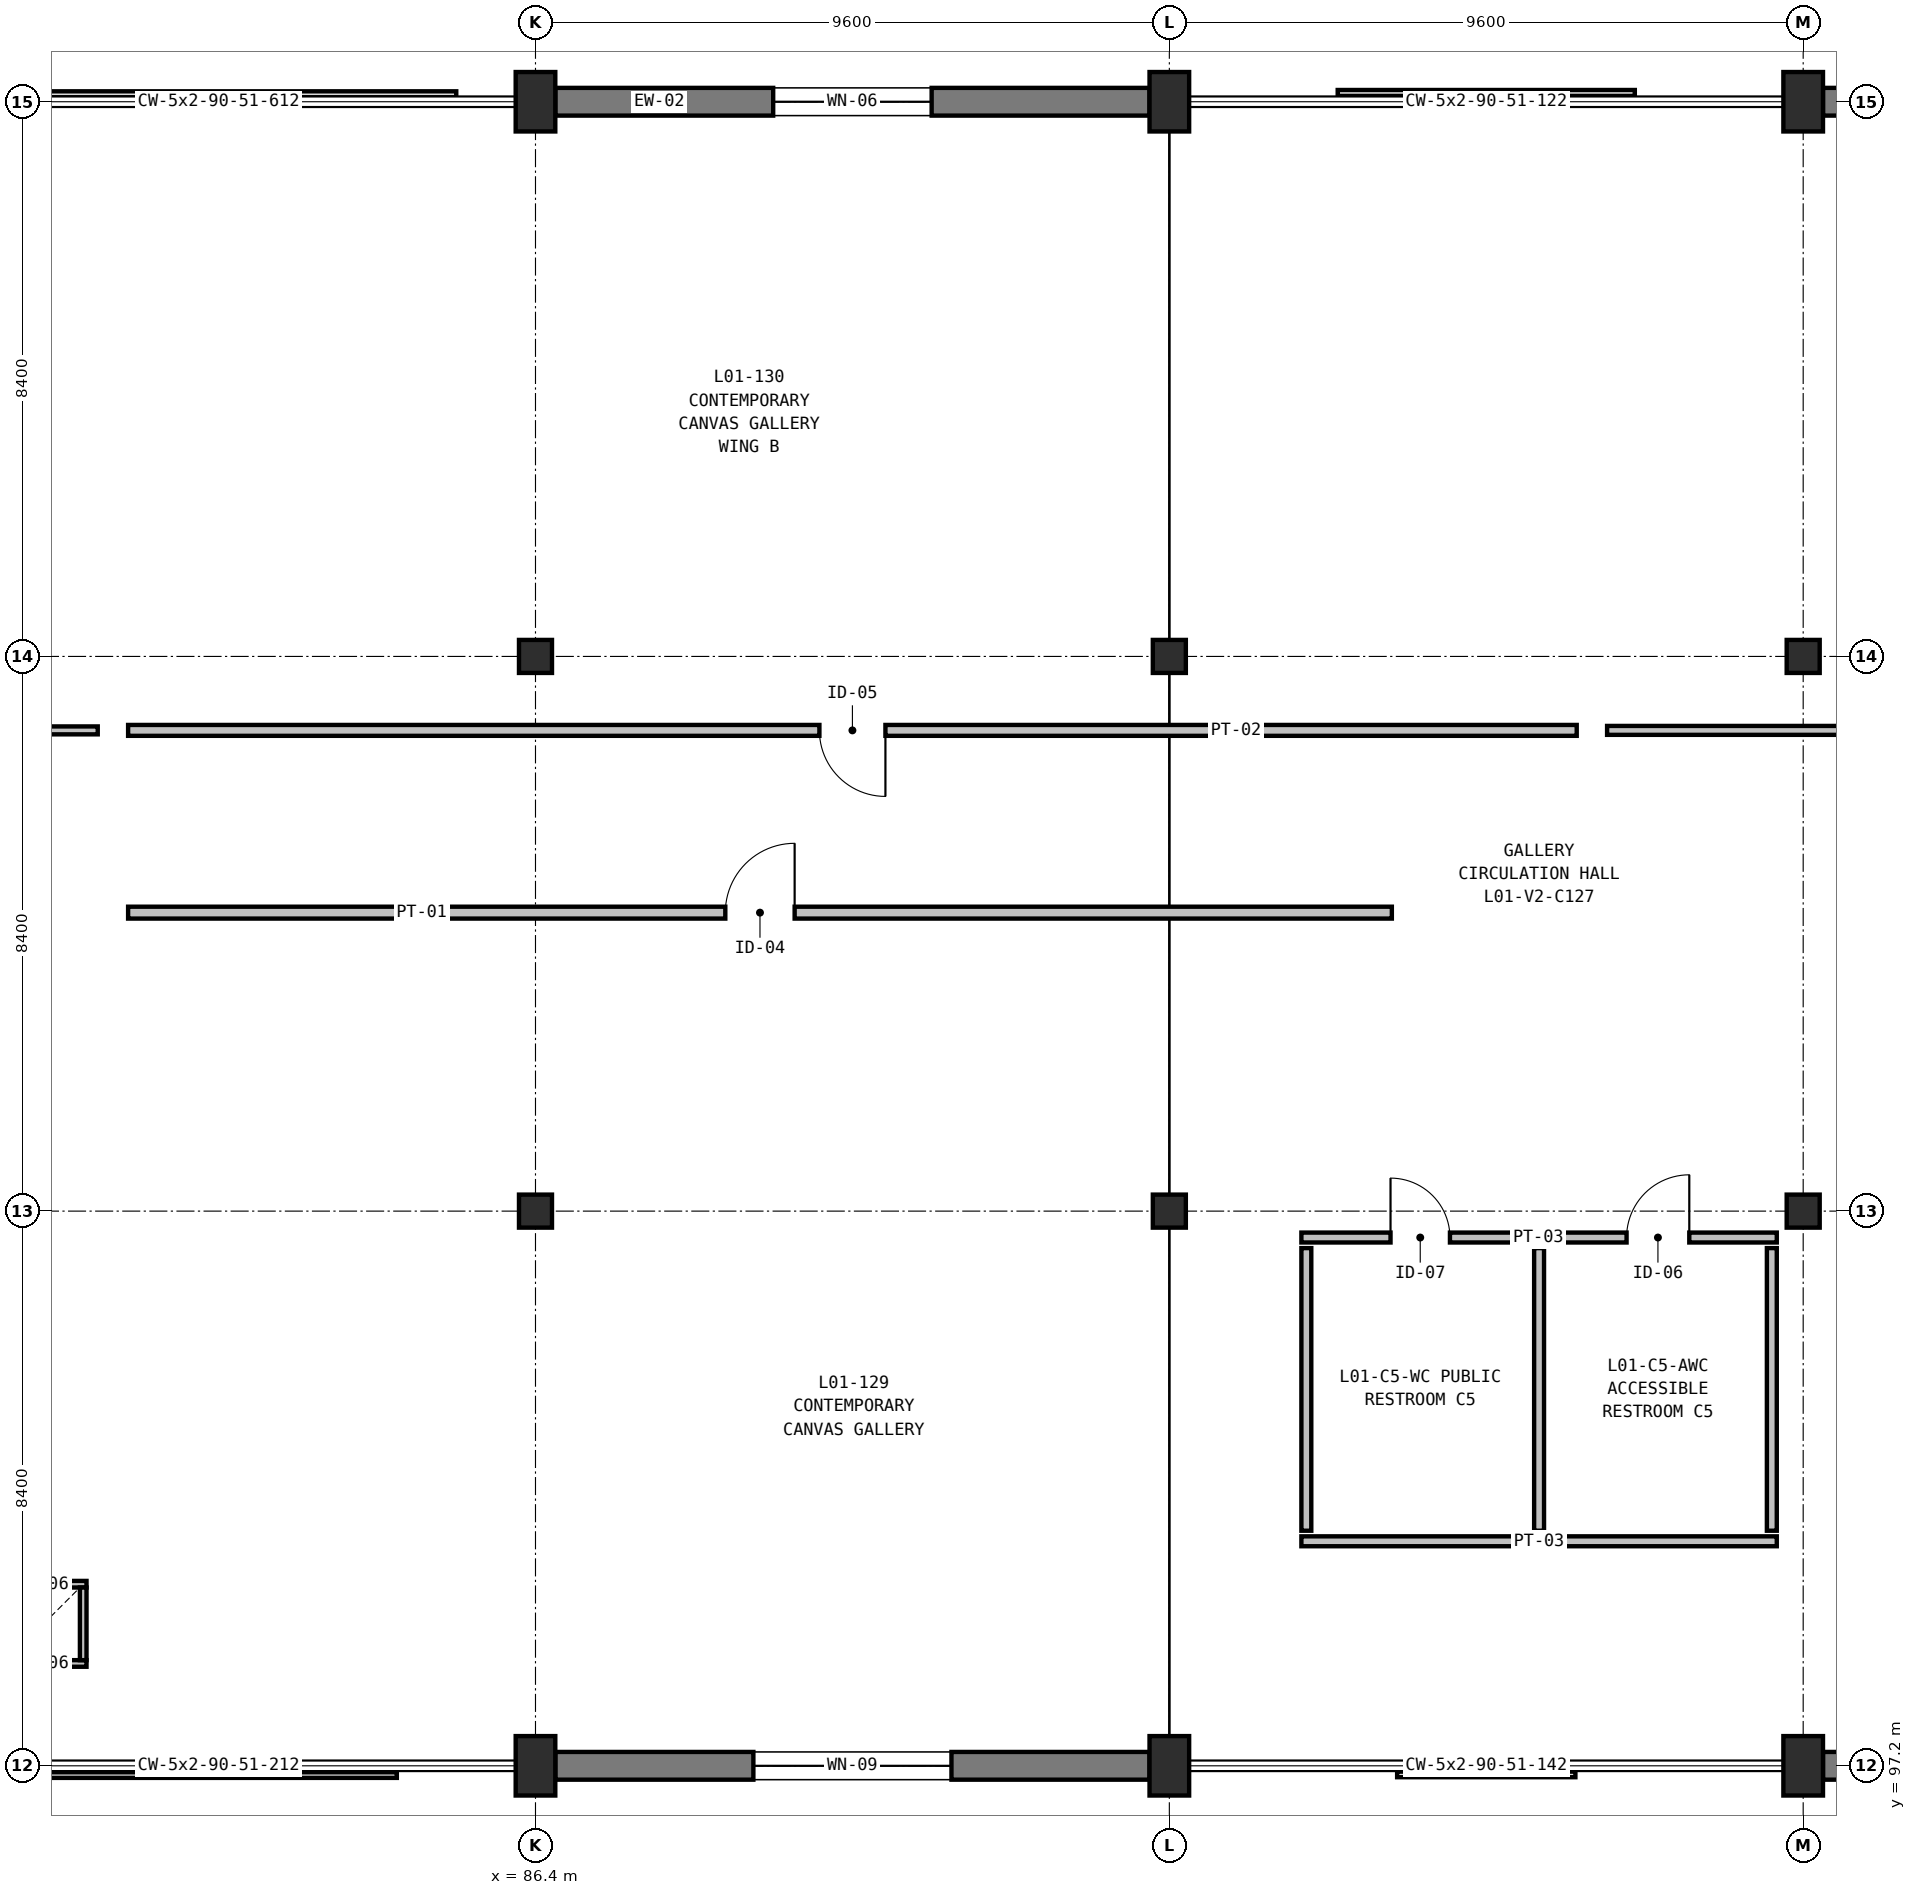
"""IFC4 building model, lengths in metres.
Left out: names, types, materials, properties, quantities, classifications, styles, units other than length and angle.
Written with IfcOpenShell. Run it as: python <this file> out.ifc"""

import sys

from ifc_helpers import new_model, si_unit, direction, frame, frame_2d, origin, origin_2d, place, context, subcontext, project, spatial, rectangle, extrude, element, fill, save


model = new_model("IFC4")
c1 = context("Model", 3, precision=1e-05, world=origin(), true_north=direction((0.0, 1.0)))
c2 = subcontext(c1, "Body", "Model", "MODEL_VIEW")
j1 = project(units=[si_unit("LENGTHUNIT", "METRE"), si_unit("PLANEANGLEUNIT", "RADIAN")], contexts=[c1])
p1 = place(None, origin())
s1 = spatial("IfcSite", under=j1, at=p1, CompositionType="ELEMENT")
p2 = place(p1, origin())
s2 = spatial("IfcBuilding", under=s1, at=p2, CompositionType="ELEMENT")
p3 = place(p2, frame((0.0, 0.0, 6.0)))
s3 = spatial("IfcBuildingStorey", under=s2, at=p3, CompositionType="ELEMENT", Elevation=6.0)
p4 = place(p3, frame((86.4, 97.2, 0.0), z_axis=(0.0, 0.0, 1.0), x_axis=(1.0, 0.0, 0.0)))
e1 = element("IfcColumn", 1, at=p4, inside=s3, PredefinedType="COLUMN", context=c2, shape_type="SweptSolid", body=[
    extrude(rectangle(XDim=0.6, YDim=0.9, at=origin_2d()), origin(), (0.0, 0.0, 1.0), 5.4),
])
for number, where, z_axis, x_axis in (
    (2, (86.4, 105.6, 0.0), (0.0, 0.0, 1.0), (1.0, 0.0, 0.0)),
    (3, (86.4, 114.0, 0.0), (0.0, 0.0, 1.0), (1.0, 0.0, 0.0)),
):
    element("IfcColumn", number, at=place(p3, frame(where, z_axis=z_axis, x_axis=x_axis)), inside=s3, PredefinedType="COLUMN", context=c2, shape_type="SweptSolid", body=[
        extrude(rectangle(XDim=0.5, YDim=0.5, at=origin_2d()), origin(), (0.0, 0.0, 1.0), 5.4),
    ])
for number, where, z_axis, x_axis in (
    (4, (86.4, 122.4, 0.0), (0.0, 0.0, 1.0), (1.0, 0.0, 0.0)),
    (5, (96.0, 97.2, 0.0), (0.0, 0.0, 1.0), (1.0, 0.0, 0.0)),
):
    element("IfcColumn", number, at=place(p3, frame(where, z_axis=z_axis, x_axis=x_axis)), inside=s3, PredefinedType="COLUMN", context=c2, shape_type="SweptSolid", body=[
        extrude(rectangle(XDim=0.6, YDim=0.9, at=origin_2d()), origin(), (0.0, 0.0, 1.0), 5.4),
    ])
for number, where, z_axis, x_axis in (
    (6, (96.0, 105.6, 0.0), (0.0, 0.0, 1.0), (1.0, 0.0, 0.0)),
    (7, (96.0, 114.0, 0.0), (0.0, 0.0, 1.0), (1.0, 0.0, 0.0)),
):
    element("IfcColumn", number, at=place(p3, frame(where, z_axis=z_axis, x_axis=x_axis)), inside=s3, PredefinedType="COLUMN", context=c2, shape_type="SweptSolid", body=[
        extrude(rectangle(XDim=0.5, YDim=0.5, at=origin_2d()), origin(), (0.0, 0.0, 1.0), 5.4),
    ])
for number, where, z_axis, x_axis in (
    (8, (96.0, 122.4, 0.0), (0.0, 0.0, 1.0), (1.0, 0.0, 0.0)),
    (9, (105.6, 97.2, 0.0), (0.0, 0.0, 1.0), (1.0, 0.0, 0.0)),
):
    element("IfcColumn", number, at=place(p3, frame(where, z_axis=z_axis, x_axis=x_axis)), inside=s3, PredefinedType="COLUMN", context=c2, shape_type="SweptSolid", body=[
        extrude(rectangle(XDim=0.6, YDim=0.9, at=origin_2d()), origin(), (0.0, 0.0, 1.0), 5.4),
    ])
for number, where, z_axis, x_axis in (
    (10, (105.6, 105.6, 0.0), (0.0, 0.0, 1.0), (1.0, 0.0, 0.0)),
    (11, (105.6, 114.0, 0.0), (0.0, 0.0, 1.0), (1.0, 0.0, 0.0)),
):
    element("IfcColumn", number, at=place(p3, frame(where, z_axis=z_axis, x_axis=x_axis)), inside=s3, PredefinedType="COLUMN", context=c2, shape_type="SweptSolid", body=[
        extrude(rectangle(XDim=0.5, YDim=0.5, at=origin_2d()), origin(), (0.0, 0.0, 1.0), 5.4),
    ])
p5 = place(p3, frame((105.6, 122.4, 0.0), z_axis=(0.0, 0.0, 1.0), x_axis=(1.0, 0.0, 0.0)))
e12 = element("IfcColumn", 12, at=p5, inside=s3, PredefinedType="COLUMN", context=c2, shape_type="SweptSolid", body=[
    extrude(rectangle(XDim=0.6, YDim=0.9, at=origin_2d()), origin(), (0.0, 0.0, 1.0), 5.4),
])
p6 = place(p3, frame((86.7, 122.4, 0.0), z_axis=(0.0, 0.0, 1.0), x_axis=(1.0, 0.0, 0.0)))
e13 = element("IfcWall", 13, at=p6, inside=s3, PredefinedType="SOLIDWALL", context=c2, shape_type="SweptSolid", body=[
    extrude(rectangle(XDim=9.0, YDim=0.42, at=frame_2d((4.5, 0.0))), origin(), (0.0, 0.0, 1.0), 5.08),
])
p7 = place(p6, frame((3.3, 0.0, 0.9)))
e14 = element("IfcOpeningElement", 14, at=p7, cuts=e13, PredefinedType="OPENING", context=c2, shape_type="SweptSolid", body=[
    extrude(rectangle(XDim=2.4, YDim=2.1, at=frame_2d((1.2, 1.05))), frame((0.0, 0.22, 0.0), z_axis=(0.0, -1.0, 0.0), x_axis=(1.0, 0.0, 0.0)), (0.0, 0.0, 1.0), 0.44),
])
p8 = place(p3, frame((105.9, 122.4, 0.0), z_axis=(0.0, 0.0, 1.0), x_axis=(1.0, 0.0, 0.0)))
e15 = element("IfcWall", 15, at=p8, inside=s3, PredefinedType="SOLIDWALL", context=c2, shape_type="SweptSolid", body=[
    extrude(rectangle(XDim=9.0, YDim=0.42, at=frame_2d((4.5, 0.0))), origin(), (0.0, 0.0, 1.0), 5.08),
])
p9 = place(p8, frame((3.75, 0.0, 0.9)))
e16 = element("IfcOpeningElement", 16, at=p9, cuts=e15, PredefinedType="OPENING", context=c2, shape_type="SweptSolid", body=[
    extrude(rectangle(XDim=1.5, YDim=2.1, at=frame_2d((0.75, 1.05))), frame((0.0, 0.22, 0.0), z_axis=(0.0, -1.0, 0.0), x_axis=(1.0, 0.0, 0.0)), (0.0, 0.0, 1.0), 0.44),
])
p10 = place(p3, frame((114.9, 97.2, 0.0), z_axis=(0.0, 0.0, 1.0), x_axis=(-1.0, 0.0, 0.0)))
e17 = element("IfcWall", 17, at=p10, inside=s3, PredefinedType="SOLIDWALL", context=c2, shape_type="SweptSolid", body=[
    extrude(rectangle(XDim=9.0, YDim=0.42, at=frame_2d((4.5, 0.0))), origin(), (0.0, 0.0, 1.0), 5.08),
])
p11 = place(p10, frame((3.9, 0.0, 0.9)))
e18 = element("IfcOpeningElement", 18, at=p11, cuts=e17, PredefinedType="OPENING", context=c2, shape_type="SweptSolid", body=[
    extrude(rectangle(XDim=1.2, YDim=2.1, at=frame_2d((0.6, 1.05))), frame((0.0, 0.22, 0.0), z_axis=(0.0, -1.0, 0.0), x_axis=(1.0, 0.0, 0.0)), (0.0, 0.0, 1.0), 0.44),
])
p12 = place(p3, frame((95.7, 97.2, 0.0), z_axis=(0.0, 0.0, 1.0), x_axis=(-1.0, 0.0, 0.0)))
e19 = element("IfcWall", 19, at=p12, inside=s3, PredefinedType="SOLIDWALL", context=c2, shape_type="SweptSolid", body=[
    extrude(rectangle(XDim=9.0, YDim=0.42, at=frame_2d((4.5, 0.0))), origin(), (0.0, 0.0, 1.0), 5.08),
])
p13 = place(p12, frame((3.0, 0.0, 0.9)))
e20 = element("IfcOpeningElement", 20, at=p13, cuts=e19, PredefinedType="OPENING", context=c2, shape_type="SweptSolid", body=[
    extrude(rectangle(XDim=3.0, YDim=2.2, at=frame_2d((1.5, 1.1))), frame((0.0, 0.22, 0.0), z_axis=(0.0, -1.0, 0.0), x_axis=(1.0, 0.0, 0.0)), (0.0, 0.0, 1.0), 0.44),
])
p14 = place(p3, frame((98.0, 105.2, 0.0), z_axis=(0.0, 0.0, 1.0), x_axis=(1.0, 0.0, 0.0)))
e21 = element("IfcWall", 21, at=p14, inside=s3, PredefinedType="PARTITIONING", context=c2, shape_type="SweptSolid", body=[
    extrude(rectangle(XDim=7.2, YDim=0.15, at=frame_2d((3.6, 0.0))), origin(), (0.0, 0.0, 1.0), 5.08),
])
p15 = place(p14, frame((1.35, 0.0, 0.0)))
e22 = element("IfcOpeningElement", 22, at=p15, cuts=e21, PredefinedType="OPENING", context=c2, shape_type="SweptSolid", body=[
    extrude(rectangle(XDim=0.9, YDim=2.1, at=frame_2d((0.45, 1.05))), frame((0.0, 0.085, 0.0), z_axis=(0.0, -1.0, 0.0), x_axis=(1.0, 0.0, 0.0)), (0.0, 0.0, 1.0), 0.17),
])
p16 = place(p14, frame((4.925, 0.0, 0.0)))
e23 = element("IfcOpeningElement", 23, at=p16, cuts=e21, PredefinedType="OPENING", context=c2, shape_type="SweptSolid", body=[
    extrude(rectangle(XDim=0.95, YDim=2.15, at=frame_2d((0.475, 1.075))), frame((0.0, 0.085, 0.0), z_axis=(0.0, -1.0, 0.0), x_axis=(1.0, 0.0, 0.0)), (0.0, 0.0, 1.0), 0.17),
])
p17 = place(p3, frame((98.0, 100.6, 0.0), z_axis=(0.0, 0.0, 1.0), x_axis=(1.0, 0.0, 0.0)))
e24 = element("IfcWall", 24, at=p17, inside=s3, PredefinedType="PARTITIONING", context=c2, shape_type="SweptSolid", body=[
    extrude(rectangle(XDim=7.2, YDim=0.15, at=frame_2d((3.6, 0.0))), origin(), (0.0, 0.0, 1.0), 5.08),
])
for number, where, z_axis, x_axis in (
    (25, (98.075, 100.76, 0.0), (0.0, 0.0, 1.0), (0.0, 1.0, 0.0)),
    (26, (101.6, 100.76, 0.0), (0.0, 0.0, 1.0), (0.0, 1.0, 0.0)),
    (27, (105.125, 100.76, 0.0), (0.0, 0.0, 1.0), (0.0, 1.0, 0.0)),
):
    element("IfcWall", number, at=place(p3, frame(where, z_axis=z_axis, x_axis=x_axis)), inside=s3, PredefinedType="PARTITIONING", context=c2, shape_type="SweptSolid", body=[
        extrude(rectangle(XDim=4.28, YDim=0.15, at=frame_2d((2.14, 0.0))), origin(), (0.0, 0.0, 1.0), 4.455),
    ])
for number, where, z_axis, x_axis in (
    (28, (78.3, 99.95, 0.0), (0.0, 0.0, 1.0), (1.0, 0.0, 0.0)),
    (29, (79.6, 98.75, 0.0), (0.0, 0.0, 1.0), (-1.0, 0.0, 0.0)),
):
    element("IfcWall", number, at=place(p3, frame(where, z_axis=z_axis, x_axis=x_axis)), inside=s3, PredefinedType="PARTITIONING", context=c2, shape_type="SweptSolid", body=[
        extrude(rectangle(XDim=1.3, YDim=0.1, at=frame_2d((0.65, 0.0))), origin(), (0.0, 0.0, 1.0), 5.08),
    ])
p18 = place(p3, frame((79.55, 99.9, 0.0), z_axis=(0.0, 0.0, 1.0), x_axis=(0.0, -1.0, 0.0)))
e30 = element("IfcWall", 30, at=p18, inside=s3, PredefinedType="PARTITIONING", context=c2, shape_type="SweptSolid", body=[
    extrude(rectangle(XDim=1.1, YDim=0.1, at=frame_2d((0.55, 0.0))), origin(), (0.0, 0.0, 1.0), 5.08),
])
p19 = place(p3, frame((79.77, 112.88, 0.0), z_axis=(0.0, 0.0, 1.0), x_axis=(-1.0, 0.0, 0.0)))
e31 = element("IfcWall", 31, at=p19, inside=s3, PredefinedType="PARTITIONING", context=c2, shape_type="SweptSolid", body=[
    extrude(rectangle(XDim=21.62, YDim=0.12, at=frame_2d((10.81, 0.0))), origin(), (0.0, 0.0, 1.0), 4.355),
])
p20 = place(p19, frame((10.11, 0.0, 0.0)))
e32 = element("IfcOpeningElement", 32, at=p20, cuts=e31, PredefinedType="OPENING", context=c2, shape_type="SweptSolid", body=[
    extrude(rectangle(XDim=1.4, YDim=2.3, at=frame_2d((0.7, 1.15))), frame((0.0, 0.07, 0.0), z_axis=(0.0, -1.0, 0.0), x_axis=(1.0, 0.0, 0.0)), (0.0, 0.0, 1.0), 0.14),
])
p21 = place(p3, frame((80.23, 110.12, 0.0), z_axis=(0.0, 0.0, 1.0), x_axis=(1.0, 0.0, 0.0)))
e33 = element("IfcWall", 33, at=p21, inside=s3, PredefinedType="PARTITIONING", context=c2, shape_type="SweptSolid", body=[
    extrude(rectangle(XDim=19.14, YDim=0.18, at=frame_2d((9.57, 0.0))), origin(), (0.0, 0.0, 1.0), 4.355),
])
p22 = place(p21, frame((9.045, 0.0, 0.0)))
e34 = element("IfcOpeningElement", 34, at=p22, cuts=e33, PredefinedType="OPENING", context=c2, shape_type="SweptSolid", body=[
    extrude(rectangle(XDim=1.05, YDim=2.2, at=frame_2d((0.525, 1.1))), frame((0.0, 0.1, 0.0), z_axis=(0.0, -1.0, 0.0), x_axis=(1.0, 0.0, 0.0)), (0.0, 0.0, 1.0), 0.2),
])
p23 = place(p3, frame((102.17, 112.88, 0.0), z_axis=(0.0, 0.0, 1.0), x_axis=(-1.0, 0.0, 0.0)))
e35 = element("IfcWall", 35, at=p23, inside=s3, PredefinedType="PARTITIONING", context=c2, shape_type="SweptSolid", body=[
    extrude(rectangle(XDim=21.94, YDim=0.165, at=frame_2d((10.97, 0.0))), origin(), (0.0, 0.0, 1.0), 4.355),
])
p24 = place(p23, frame((10.47, 0.0, 0.0)))
e36 = element("IfcOpeningElement", 36, at=p24, cuts=e35, PredefinedType="OPENING", context=c2, shape_type="SweptSolid", body=[
    extrude(rectangle(XDim=1.0, YDim=2.15, at=frame_2d((0.5, 1.075))), frame((0.0, 0.093, 0.0), z_axis=(0.0, -1.0, 0.0), x_axis=(1.0, 0.0, 0.0)), (0.0, 0.0, 1.0), 0.185),
])
p25 = place(p3, frame((124.25, 112.88, 0.0), z_axis=(0.0, 0.0, 1.0), x_axis=(-1.0, 0.0, 0.0)))
e37 = element("IfcWall", 37, at=p25, inside=s3, PredefinedType="PARTITIONING", context=c2, shape_type="SweptSolid", body=[
    extrude(rectangle(XDim=21.62, YDim=0.135, at=frame_2d((10.81, 0.0))), origin(), (0.0, 0.0, 1.0), 4.355),
])
p26 = place(p25, frame((10.61, 0.0, 0.0)))
e38 = element("IfcOpeningElement", 38, at=p26, cuts=e37, PredefinedType="OPENING", context=c2, shape_type="SweptSolid", body=[
    extrude(rectangle(XDim=2.4, YDim=2.6, at=frame_2d((1.2, 1.3))), frame((0.0, 0.077, 0.0), z_axis=(0.0, -1.0, 0.0), x_axis=(1.0, 0.0, 0.0)), (0.0, 0.0, 1.0), 0.155),
])
p27 = place(p7, origin())
e39 = element("IfcWindow", 39, at=p27, inside=s3, PartitioningType="SINGLE_PANEL", PredefinedType="WINDOW", context=c2, shape_type="SweptSolid", body=[
    extrude(rectangle(XDim=2.4, YDim=2.1, at=frame_2d((1.2, 1.05))), frame((0.0, 0.03, 0.0), z_axis=(0.0, -1.0, 0.0), x_axis=(1.0, 0.0, 0.0)), (0.0, 0.0, 1.0), 0.06),
])
fill(e14, e39)
p28 = place(p13, origin())
e40 = element("IfcWindow", 40, at=p28, inside=s3, PartitioningType="SINGLE_PANEL", PredefinedType="WINDOW", context=c2, shape_type="SweptSolid", body=[
    extrude(rectangle(XDim=3.0, YDim=2.2, at=frame_2d((1.5, 1.1))), frame((0.0, 0.03, 0.0), z_axis=(0.0, -1.0, 0.0), x_axis=(1.0, 0.0, 0.0)), (0.0, 0.0, 1.0), 0.06),
])
fill(e20, e40)
p29 = place(p15, origin())
e41 = element("IfcDoor", 41, at=p29, inside=s3, OperationType="SINGLE_SWING_LEFT", PredefinedType="DOOR", context=c2, shape_type="SweptSolid", body=[
    extrude(rectangle(XDim=0.9, YDim=2.1, at=frame_2d((0.45, 1.05))), frame((0.0, 0.025, 0.0), z_axis=(0.0, -1.0, 0.0), x_axis=(1.0, 0.0, 0.0)), (0.0, 0.0, 1.0), 0.05),
])
fill(e22, e41)
p30 = place(p16, origin())
e42 = element("IfcDoor", 42, at=p30, inside=s3, OperationType="SINGLE_SWING_RIGHT", PredefinedType="DOOR", context=c2, shape_type="SweptSolid", body=[
    extrude(rectangle(XDim=0.95, YDim=2.15, at=frame_2d((0.475, 1.075))), frame((0.0, 0.025, 0.0), z_axis=(0.0, -1.0, 0.0), x_axis=(1.0, 0.0, 0.0)), (0.0, 0.0, 1.0), 0.05),
])
fill(e23, e42)
p31 = place(p22, origin())
e43 = element("IfcDoor", 43, at=p31, inside=s3, OperationType="SINGLE_SWING_RIGHT", PredefinedType="DOOR", context=c2, shape_type="SweptSolid", body=[
    extrude(rectangle(XDim=1.05, YDim=2.2, at=frame_2d((0.525, 1.1))), frame((0.0, 0.025, 0.0), z_axis=(0.0, -1.0, 0.0), x_axis=(1.0, 0.0, 0.0)), (0.0, 0.0, 1.0), 0.05),
])
fill(e34, e43)
p32 = place(p24, origin())
e44 = element("IfcDoor", 44, at=p32, inside=s3, OperationType="SINGLE_SWING_LEFT", PredefinedType="DOOR", context=c2, shape_type="SweptSolid", body=[
    extrude(rectangle(XDim=1.0, YDim=2.15, at=frame_2d((0.5, 1.075))), frame((0.0, 0.025, 0.0), z_axis=(0.0, -1.0, 0.0), x_axis=(1.0, 0.0, 0.0)), (0.0, 0.0, 1.0), 0.05),
])
fill(e36, e44)
save(model, sys.argv[1])
